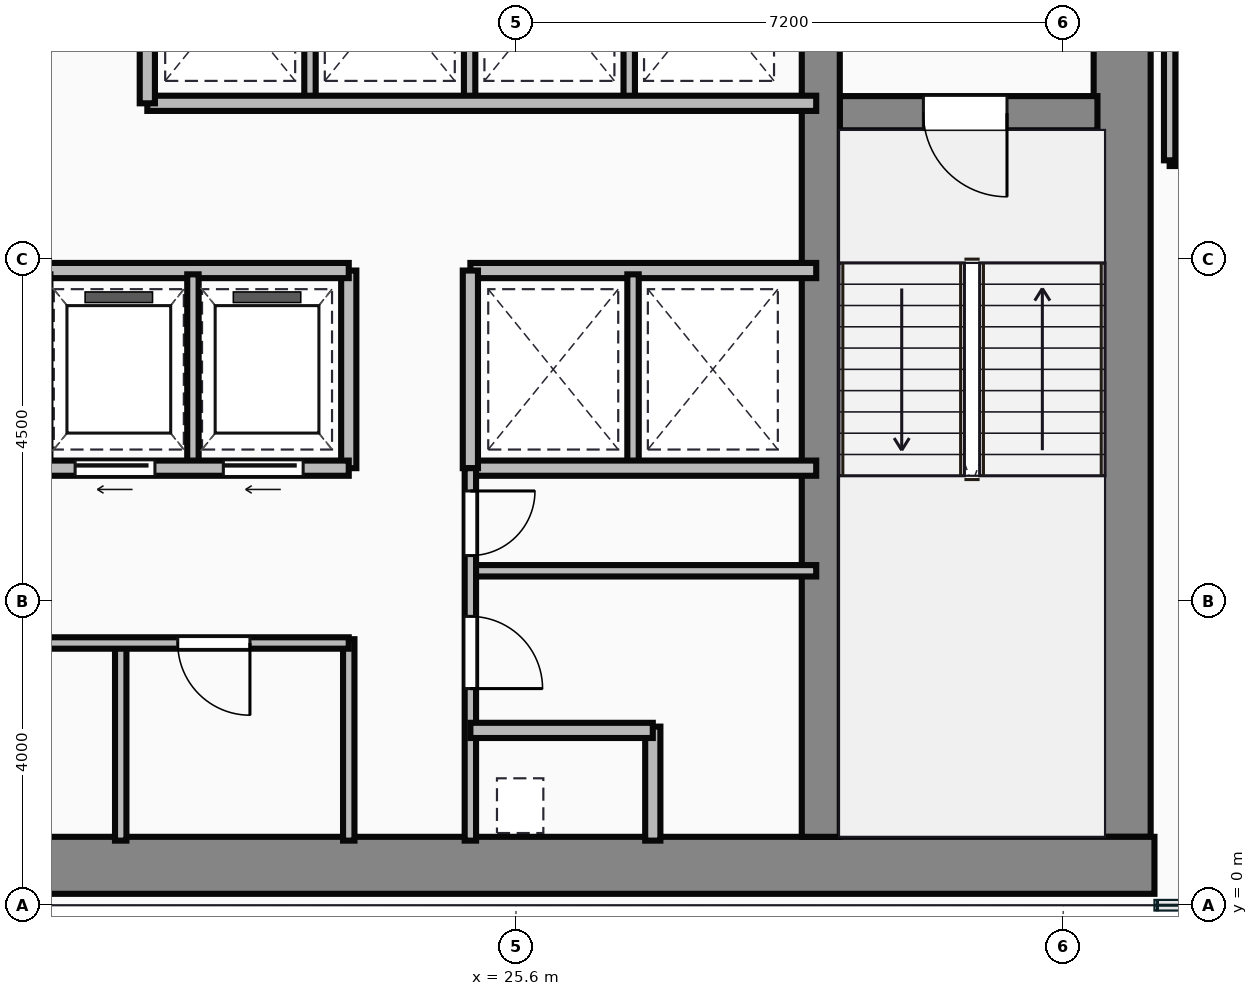
"""IFC4 building model, lengths in metres.
Left out: names, types, materials, properties, quantities, classifications, styles, units other than length and angle.
Written with IfcOpenShell. Run it as: python <this file> out.ifc"""

import sys

from ifc_helpers import new_model, si_unit, direction, frame, frame_2d, origin, place, context, subcontext, project, spatial, rectangle, extrude, source, transform, mapped, element, fill, save


model = new_model("IFC4")
c1 = context("Model", 3, precision=1e-05, world=origin(), true_north=direction((0.0, 1.0)))
c2 = subcontext(c1, "Body", "Model", "MODEL_VIEW")
j1 = project(units=[si_unit("LENGTHUNIT", "METRE"), si_unit("PLANEANGLEUNIT", "RADIAN")], contexts=[c1])
p1 = place(None, origin())
s1 = spatial("IfcSite", under=j1, at=p1, CompositionType="ELEMENT")
p2 = place(p1, origin())
s2 = spatial("IfcBuilding", under=s1, at=p2, CompositionType="ELEMENT")
p3 = place(p2, frame((0.0, 0.0, 121.5)))
s3 = spatial("IfcBuildingStorey", under=s2, at=p3, CompositionType="ELEMENT", Elevation=121.5)
m1 = source(origin(), c2, "Body", "SweptSolid", [
    extrude(rectangle(XDim=29.5, YDim=0.75, at=frame_2d((14.75, 0.0))), origin(), (0.0, 0.0, 1.0), 3.65),
])
p4 = place(p3, frame((4.5, 0.525, 0.0), z_axis=(0.0, 0.0, 1.0), x_axis=(1.0, 0.0, 0.0)))
e1 = element("IfcWall", 1, at=p4, inside=s3, PredefinedType="SHEAR", context=c2, shape_type="MappedRepresentation", body=[
    mapped(m1, transform((0.0, 0.0, 0.0))),
])
m2 = source(origin(), c2, "Body", "SweptSolid", [
    extrude(rectangle(XDim=13.1, YDim=0.75, at=frame_2d((6.55, 0.0))), origin(), (0.0, 0.0, 1.0), 3.65),
])
p5 = place(p3, frame((33.575, 0.9, 0.0), z_axis=(0.0, 0.0, 1.0), x_axis=(0.0, 1.0, 0.0)))
e2 = element("IfcWall", 2, at=p5, inside=s3, PredefinedType="SHEAR", context=c2, shape_type="MappedRepresentation", body=[
    mapped(m2, transform((0.0, 0.0, 0.0))),
])
m3 = source(origin(), c2, "Body", "SweptSolid", [
    extrude(rectangle(XDim=12.35, YDim=0.5, at=frame_2d((6.175, 0.0))), origin(), (0.0, 0.0, 1.0), 3.65),
])
p6 = place(p3, frame((29.61, 0.9, 0.0), z_axis=(0.0, 0.0, 1.0), x_axis=(0.0, 1.0, 0.0)))
e3 = element("IfcWall", 3, at=p6, inside=s3, PredefinedType="SHEAR", context=c2, shape_type="MappedRepresentation", body=[
    mapped(m3, transform((0.0, 0.0, 0.0))),
])
m4 = source(origin(), c2, "Body", "SweptSolid", [
    extrude(rectangle(XDim=3.39, YDim=0.45, at=frame_2d((1.695, 0.0))), origin(), (0.0, 0.0, 1.0), 3.65),
])
p7 = place(p3, frame((29.86, 10.42, 0.0), z_axis=(0.0, 0.0, 1.0), x_axis=(1.0, 0.0, 0.0)))
e4 = element("IfcWall", 4, at=p7, inside=s3, PredefinedType="SHEAR", context=c2, shape_type="MappedRepresentation", body=[
    mapped(m4, transform((0.0, 0.0, 0.0))),
])
p8 = place(p7, frame((1.1, 0.0, 0.0)))
e5 = element("IfcOpeningElement", 5, at=p8, cuts=e4, PredefinedType="OPENING", context=c2, shape_type="SweptSolid", body=[
    extrude(rectangle(XDim=1.1, YDim=2.15, at=frame_2d((0.55, 1.075))), frame((0.0, 0.235, 0.0), z_axis=(0.0, -1.0, 0.0), x_axis=(1.0, 0.0, 0.0)), (0.0, 0.0, 1.0), 0.47),
])
m5 = source(origin(), c2, "Body", "SweptSolid", [
    extrude(rectangle(XDim=10.35, YDim=0.15, at=frame_2d((5.175, 0.0))), origin(), (0.0, 0.0, 1.0), 3.4),
])
p9 = place(p3, frame((13.05, 3.45, 0.0), z_axis=(0.0, 0.0, 1.0), x_axis=(1.0, 0.0, 0.0)))
e6 = element("IfcWall", 6, at=p9, inside=s3, PredefinedType="PARTITIONING", context=c2, shape_type="MappedRepresentation", body=[
    mapped(m5, transform((0.0, 0.0, 0.0))),
])
p10 = place(p9, frame((3.8, 0.0, 0.0)))
e7 = element("IfcOpeningElement", 7, at=p10, cuts=e6, PredefinedType="OPENING", context=c2, shape_type="SweptSolid", body=[
    extrude(rectangle(XDim=0.95, YDim=2.15, at=frame_2d((0.475, 1.075))), frame((0.0, 0.085, 0.0), z_axis=(0.0, -1.0, 0.0), x_axis=(1.0, 0.0, 0.0)), (0.0, 0.0, 1.0), 0.17),
])
p11 = place(p9, frame((8.1, 0.0, 0.0)))
e8 = element("IfcOpeningElement", 8, at=p11, cuts=e6, PredefinedType="OPENING", context=c2, shape_type="SweptSolid", body=[
    extrude(rectangle(XDim=0.95, YDim=2.15, at=frame_2d((0.475, 1.075))), frame((0.0, 0.085, 0.0), z_axis=(0.0, -1.0, 0.0), x_axis=(1.0, 0.0, 0.0)), (0.0, 0.0, 1.0), 0.17),
])
m6 = source(origin(), c2, "Body", "SweptSolid", [
    extrude(rectangle(XDim=2.65, YDim=0.15, at=frame_2d((1.325, 0.0))), origin(), (0.0, 0.0, 1.0), 3.4),
])
p12 = place(p3, frame((23.4, 0.85, 0.0), z_axis=(0.0, 0.0, 1.0), x_axis=(0.0, 1.0, 0.0)))
e9 = element("IfcWall", 9, at=p12, inside=s3, PredefinedType="PARTITIONING", context=c2, shape_type="MappedRepresentation", body=[
    mapped(m6, transform((0.0, 0.0, 0.0))),
])
m7 = source(origin(), c2, "Body", "SweptSolid", [
    extrude(rectangle(XDim=2.6, YDim=0.15, at=frame_2d((1.3, 0.0))), origin(), (0.0, 0.0, 1.0), 3.4),
])
p13 = place(p3, frame((20.4, 0.85, 0.0), z_axis=(0.0, 0.0, 1.0), x_axis=(0.0, 1.0, 0.0)))
e10 = element("IfcWall", 10, at=p13, inside=s3, PredefinedType="PARTITIONING", context=c2, shape_type="MappedRepresentation", body=[
    mapped(m7, transform((0.0, 0.0, 0.0))),
])
m8 = source(origin(), c2, "Body", "SweptSolid", [
    extrude(rectangle(XDim=11.85, YDim=0.2, at=frame_2d((5.925, 0.0))), origin(), (0.0, 0.0, 1.0), 3.4),
])
p14 = place(p3, frame((11.55, 5.75, 0.0), z_axis=(0.0, 0.0, 1.0), x_axis=(1.0, 0.0, 0.0)))
e11 = element("IfcWall", 11, at=p14, inside=s3, PredefinedType="PARTITIONING", context=c2, shape_type="MappedRepresentation", body=[
    mapped(m8, transform((0.0, 0.0, 0.0))),
])
p15 = place(p14, frame((0.45, 0.0, 0.0)))
e12 = element("IfcOpeningElement", 12, at=p15, cuts=e11, PredefinedType="OPENING", context=c2, shape_type="SweptSolid", body=[
    extrude(rectangle(XDim=1.05, YDim=2.15, at=frame_2d((0.525, 1.075))), frame((0.0, 0.11, 0.0), z_axis=(0.0, -1.0, 0.0), x_axis=(1.0, 0.0, 0.0)), (0.0, 0.0, 1.0), 0.22),
])
p16 = place(p14, frame((2.4, 0.0, 0.0)))
e13 = element("IfcOpeningElement", 13, at=p16, cuts=e11, PredefinedType="OPENING", context=c2, shape_type="SweptSolid", body=[
    extrude(rectangle(XDim=1.05, YDim=2.15, at=frame_2d((0.525, 1.075))), frame((0.0, 0.11, 0.0), z_axis=(0.0, -1.0, 0.0), x_axis=(1.0, 0.0, 0.0)), (0.0, 0.0, 1.0), 0.22),
])
p17 = place(p14, frame((4.35, 0.0, 0.0)))
e14 = element("IfcOpeningElement", 14, at=p17, cuts=e11, PredefinedType="OPENING", context=c2, shape_type="SweptSolid", body=[
    extrude(rectangle(XDim=1.05, YDim=2.15, at=frame_2d((0.525, 1.075))), frame((0.0, 0.11, 0.0), z_axis=(0.0, -1.0, 0.0), x_axis=(1.0, 0.0, 0.0)), (0.0, 0.0, 1.0), 0.22),
])
p18 = place(p14, frame((6.3, 0.0, 0.0)))
e15 = element("IfcOpeningElement", 15, at=p18, cuts=e11, PredefinedType="OPENING", context=c2, shape_type="SweptSolid", body=[
    extrude(rectangle(XDim=1.05, YDim=2.15, at=frame_2d((0.525, 1.075))), frame((0.0, 0.11, 0.0), z_axis=(0.0, -1.0, 0.0), x_axis=(1.0, 0.0, 0.0)), (0.0, 0.0, 1.0), 0.22),
])
p19 = place(p14, frame((8.25, 0.0, 0.0)))
e16 = element("IfcOpeningElement", 16, at=p19, cuts=e11, PredefinedType="OPENING", context=c2, shape_type="SweptSolid", body=[
    extrude(rectangle(XDim=1.05, YDim=2.15, at=frame_2d((0.525, 1.075))), frame((0.0, 0.11, 0.0), z_axis=(0.0, -1.0, 0.0), x_axis=(1.0, 0.0, 0.0)), (0.0, 0.0, 1.0), 0.22),
])
p20 = place(p14, frame((10.2, 0.0, 0.0)))
e17 = element("IfcOpeningElement", 17, at=p20, cuts=e11, PredefinedType="OPENING", context=c2, shape_type="SweptSolid", body=[
    extrude(rectangle(XDim=1.05, YDim=2.15, at=frame_2d((0.525, 1.075))), frame((0.0, 0.11, 0.0), z_axis=(0.0, -1.0, 0.0), x_axis=(1.0, 0.0, 0.0)), (0.0, 0.0, 1.0), 0.22),
])
p21 = place(p3, frame((11.55, 8.35, 0.0), z_axis=(0.0, 0.0, 1.0), x_axis=(1.0, 0.0, 0.0)))
e18 = element("IfcWall", 18, at=p21, inside=s3, PredefinedType="PARTITIONING", context=c2, shape_type="MappedRepresentation", body=[
    mapped(m8, transform((0.0, 0.0, 0.0))),
])
m9 = source(origin(), c2, "Body", "SweptSolid", [
    extrude(rectangle(XDim=2.6, YDim=0.2, at=frame_2d((1.3, 0.0))), origin(), (0.0, 0.0, 1.0), 3.4),
])
p22 = place(p3, frame((23.4, 5.75, 0.0), z_axis=(0.0, 0.0, 1.0), x_axis=(0.0, 1.0, 0.0)))
e19 = element("IfcWall", 19, at=p22, inside=s3, PredefinedType="PARTITIONING", context=c2, shape_type="MappedRepresentation", body=[
    mapped(m9, transform((0.0, 0.0, 0.0))),
])
m10 = source(origin(), c2, "Body", "SweptSolid", [
    extrude(rectangle(XDim=2.5, YDim=0.15, at=frame_2d((1.25, 0.0))), origin(), (0.0, 0.0, 1.0), 3.4),
])
p23 = place(p3, frame((21.35, 5.8, 0.0), z_axis=(0.0, 0.0, 1.0), x_axis=(0.0, 1.0, 0.0)))
e20 = element("IfcWall", 20, at=p23, inside=s3, PredefinedType="PARTITIONING", context=c2, shape_type="MappedRepresentation", body=[
    mapped(m10, transform((0.0, 0.0, 0.0))),
])
m11 = source(origin(), c2, "Body", "SweptSolid", [
    extrude(rectangle(XDim=8.8, YDim=0.2, at=frame_2d((4.4, 0.0))), origin(), (0.0, 0.0, 1.0), 3.4),
])
p24 = place(p3, frame((20.75, 10.55, 0.0), z_axis=(0.0, 0.0, 1.0), x_axis=(1.0, 0.0, 0.0)))
e21 = element("IfcWall", 21, at=p24, inside=s3, PredefinedType="PARTITIONING", context=c2, shape_type="MappedRepresentation", body=[
    mapped(m11, transform((0.0, 0.0, 0.0))),
])
m12 = source(origin(), c2, "Body", "SweptSolid", [
    extrude(rectangle(XDim=3.0, YDim=0.2, at=frame_2d((1.5, 0.0))), origin(), (0.0, 0.0, 1.0), 3.4),
])
p25 = place(p3, frame((20.75, 10.55, 0.0), z_axis=(0.0, 0.0, 1.0), x_axis=(0.0, 1.0, 0.0)))
e22 = element("IfcWall", 22, at=p25, inside=s3, PredefinedType="PARTITIONING", context=c2, shape_type="MappedRepresentation", body=[
    mapped(m12, transform((0.0, 0.0, 0.0))),
])
m13 = source(origin(), c2, "Body", "SweptSolid", [
    extrude(rectangle(XDim=2.85, YDim=0.15, at=frame_2d((1.425, 0.0))), origin(), (0.0, 0.0, 1.0), 3.4),
])
for number, where, z_axis, x_axis in (
    (23, (22.89, 10.6, 0.0), (0.0, 0.0, 1.0), (0.0, 1.0, 0.0)),
    (24, (24.99, 10.6, 0.0), (0.0, 0.0, 1.0), (0.0, 1.0, 0.0)),
    (25, (27.09, 10.6, 0.0), (0.0, 0.0, 1.0), (0.0, 1.0, 0.0)),
):
    element("IfcWall", number, at=place(p3, frame(where, z_axis=z_axis, x_axis=x_axis)), inside=s3, PredefinedType="PARTITIONING", context=c2, shape_type="MappedRepresentation", body=[
        mapped(m13, transform((0.0, 0.0, 0.0))),
    ])
m14 = source(origin(), c2, "Body", "SweptSolid", [
    extrude(rectangle(XDim=4.55, YDim=0.2, at=frame_2d((2.275, 0.0))), origin(), (0.0, 0.0, 1.0), 3.4),
])
for number, where, z_axis, x_axis in (
    (26, (25.0, 8.35, 0.0), (0.0, 0.0, 1.0), (1.0, 0.0, 0.0)),
    (27, (25.0, 5.75, 0.0), (0.0, 0.0, 1.0), (1.0, 0.0, 0.0)),
):
    element("IfcWall", number, at=place(p3, frame(where, z_axis=z_axis, x_axis=x_axis)), inside=s3, PredefinedType="PARTITIONING", context=c2, shape_type="MappedRepresentation", body=[
        mapped(m14, transform((0.0, 0.0, 0.0))),
    ])
p26 = place(p3, frame((25.0, 5.75, 0.0), z_axis=(0.0, 0.0, 1.0), x_axis=(0.0, 1.0, 0.0)))
e28 = element("IfcWall", 28, at=p26, inside=s3, PredefinedType="PARTITIONING", context=c2, shape_type="MappedRepresentation", body=[
    mapped(m9, transform((0.0, 0.0, 0.0))),
])
p27 = place(p3, frame((27.14, 5.8, 0.0), z_axis=(0.0, 0.0, 1.0), x_axis=(0.0, 1.0, 0.0)))
e29 = element("IfcWall", 29, at=p27, inside=s3, PredefinedType="PARTITIONING", context=c2, shape_type="MappedRepresentation", body=[
    mapped(m10, transform((0.0, 0.0, 0.0))),
])
m15 = source(origin(), c2, "Body", "SweptSolid", [
    extrude(rectangle(XDim=4.9, YDim=0.15, at=frame_2d((2.45, 0.0))), origin(), (0.0, 0.0, 1.0), 3.4),
])
p28 = place(p3, frame((25.0, 0.85, 0.0), z_axis=(0.0, 0.0, 1.0), x_axis=(0.0, 1.0, 0.0)))
e30 = element("IfcWall", 30, at=p28, inside=s3, PredefinedType="PARTITIONING", context=c2, shape_type="MappedRepresentation", body=[
    mapped(m15, transform((0.0, 0.0, 0.0))),
])
p29 = place(p28, frame((2.0, 0.0, 0.0)))
e31 = element("IfcOpeningElement", 31, at=p29, cuts=e30, PredefinedType="OPENING", context=c2, shape_type="SweptSolid", body=[
    extrude(rectangle(XDim=0.95, YDim=2.15, at=frame_2d((0.475, 1.075))), frame((0.0, 0.085, 0.0), z_axis=(0.0, -1.0, 0.0), x_axis=(1.0, 0.0, 0.0)), (0.0, 0.0, 1.0), 0.17),
])
p30 = place(p28, frame((3.75, 0.0, 0.0)))
e32 = element("IfcOpeningElement", 32, at=p30, cuts=e30, PredefinedType="OPENING", context=c2, shape_type="SweptSolid", body=[
    extrude(rectangle(XDim=0.85, YDim=2.15, at=frame_2d((0.425, 1.075))), frame((0.0, 0.085, 0.0), z_axis=(0.0, -1.0, 0.0), x_axis=(1.0, 0.0, 0.0)), (0.0, 0.0, 1.0), 0.17),
])
m16 = source(origin(), c2, "Body", "SweptSolid", [
    extrude(rectangle(XDim=2.4, YDim=0.2, at=frame_2d((1.2, 0.0))), origin(), (0.0, 0.0, 1.0), 3.4),
])
p31 = place(p3, frame((25.0, 2.3, 0.0), z_axis=(0.0, 0.0, 1.0), x_axis=(1.0, 0.0, 0.0)))
e33 = element("IfcWall", 33, at=p31, inside=s3, PredefinedType="PARTITIONING", context=c2, shape_type="MappedRepresentation", body=[
    mapped(m16, transform((0.0, 0.0, 0.0))),
])
m17 = source(origin(), c2, "Body", "SweptSolid", [
    extrude(rectangle(XDim=1.5, YDim=0.2, at=frame_2d((0.75, 0.0))), origin(), (0.0, 0.0, 1.0), 3.4),
])
p32 = place(p3, frame((27.4, 0.85, 0.0), z_axis=(0.0, 0.0, 1.0), x_axis=(0.0, 1.0, 0.0)))
e34 = element("IfcWall", 34, at=p32, inside=s3, PredefinedType="PARTITIONING", context=c2, shape_type="MappedRepresentation", body=[
    mapped(m17, transform((0.0, 0.0, 0.0))),
])
m18 = source(origin(), c2, "Body", "SweptSolid", [
    extrude(rectangle(XDim=4.55, YDim=0.15, at=frame_2d((2.275, 0.0))), origin(), (0.0, 0.0, 1.0), 3.4),
])
p33 = place(p3, frame((25.0, 4.4, 0.0), z_axis=(0.0, 0.0, 1.0), x_axis=(1.0, 0.0, 0.0)))
e35 = element("IfcWall", 35, at=p33, inside=s3, PredefinedType="PARTITIONING", context=c2, shape_type="MappedRepresentation", body=[
    mapped(m18, transform((0.0, 0.0, 0.0))),
])
m19 = source(origin(), c2, "Body", "SweptSolid", [
    extrude(rectangle(XDim=4.8, YDim=0.15, at=frame_2d((2.4, 0.0))), origin(), (0.0, 0.0, 1.0), 3.4),
])
p34 = place(p3, frame((34.2, 9.8, 0.0), z_axis=(0.0, 0.0, 1.0), x_axis=(1.0, 0.0, 0.0)))
e36 = element("IfcWall", 36, at=p34, inside=s3, PredefinedType="PARTITIONING", context=c2, shape_type="MappedRepresentation", body=[
    mapped(m19, transform((0.0, 0.0, 0.0))),
])
m20 = source(origin(), c2, "Body", "SweptSolid", [
    extrude(rectangle(XDim=4.18, YDim=0.15, at=frame_2d((2.09, 0.0))), origin(), (0.0, 0.0, 1.0), 3.4),
])
p35 = place(p3, frame((34.2, 9.8, 0.0), z_axis=(0.0, 0.0, 1.0), x_axis=(0.0, 1.0, 0.0)))
e37 = element("IfcWall", 37, at=p35, inside=s3, PredefinedType="PARTITIONING", context=c2, shape_type="MappedRepresentation", body=[
    mapped(m20, transform((0.0, 0.0, 0.0))),
])
m21 = source(origin(), c2, "Body", "SweptSolid", [
    extrude(rectangle(XDim=1.1, YDim=2.15, at=frame_2d((0.55, 1.075))), frame((0.0, 0.025, 0.0), z_axis=(0.0, -1.0, 0.0), x_axis=(1.0, 0.0, 0.0)), (0.0, 0.0, 1.0), 0.05),
])
p36 = place(p8, frame((1.1, 0.0, 0.0), z_axis=(0.0, 0.0, 1.0), x_axis=(-1.0, 0.0, 0.0)))
e38 = element("IfcDoor", 38, at=p36, inside=s3, OperationType="SINGLE_SWING_RIGHT", PredefinedType="DOOR", context=c2, shape_type="MappedRepresentation", body=[
    mapped(m21, transform((0.0, 0.0, 0.0))),
])
fill(e5, e38)
m22 = source(origin(), c2, "Body", "SweptSolid", [
    extrude(rectangle(XDim=0.95, YDim=2.15, at=frame_2d((0.475, 1.075))), frame((0.0, 0.025, 0.0), z_axis=(0.0, -1.0, 0.0), x_axis=(1.0, 0.0, 0.0)), (0.0, 0.0, 1.0), 0.05),
])
p37 = place(p11, origin())
e39 = element("IfcDoor", 39, at=p37, inside=s3, OperationType="SINGLE_SWING_RIGHT", PredefinedType="DOOR", context=c2, shape_type="MappedRepresentation", body=[
    mapped(m22, transform((0.0, 0.0, 0.0))),
])
fill(e8, e39)
m23 = source(origin(), c2, "Body", "SweptSolid", [
    extrude(rectangle(XDim=1.05, YDim=2.15, at=frame_2d((0.525, 1.075))), frame((0.0, 0.025, 0.0), z_axis=(0.0, -1.0, 0.0), x_axis=(1.0, 0.0, 0.0)), (0.0, 0.0, 1.0), 0.05),
])
p38 = place(p19, frame((1.05, 0.0, 0.0), z_axis=(0.0, 0.0, 1.0), x_axis=(-1.0, 0.0, 0.0)))
e40 = element("IfcDoor", 40, at=p38, inside=s3, OperationType="SLIDING_TO_LEFT", PredefinedType="DOOR", context=c2, shape_type="MappedRepresentation", body=[
    mapped(m23, transform((0.0, 0.0, 0.0))),
])
fill(e16, e40)
p39 = place(p20, frame((1.05, 0.0, 0.0), z_axis=(0.0, 0.0, 1.0), x_axis=(-1.0, 0.0, 0.0)))
e41 = element("IfcDoor", 41, at=p39, inside=s3, OperationType="SLIDING_TO_LEFT", PredefinedType="DOOR", context=c2, shape_type="MappedRepresentation", body=[
    mapped(m23, transform((0.0, 0.0, 0.0))),
])
fill(e17, e41)
p40 = place(p29, origin())
e42 = element("IfcDoor", 42, at=p40, inside=s3, OperationType="SINGLE_SWING_LEFT", PredefinedType="DOOR", context=c2, shape_type="MappedRepresentation", body=[
    mapped(m22, transform((0.0, 0.0, 0.0))),
])
fill(e31, e42)
m24 = source(origin(), c2, "Body", "SweptSolid", [
    extrude(rectangle(XDim=0.85, YDim=2.15, at=frame_2d((0.425, 1.075))), frame((0.0, 0.025, 0.0), z_axis=(0.0, -1.0, 0.0), x_axis=(1.0, 0.0, 0.0)), (0.0, 0.0, 1.0), 0.05),
])
p41 = place(p30, origin())
e43 = element("IfcDoor", 43, at=p41, inside=s3, OperationType="SINGLE_SWING_RIGHT", PredefinedType="DOOR", context=c2, shape_type="MappedRepresentation", body=[
    mapped(m24, transform((0.0, 0.0, 0.0))),
])
fill(e32, e43)
save(model, sys.argv[1])
